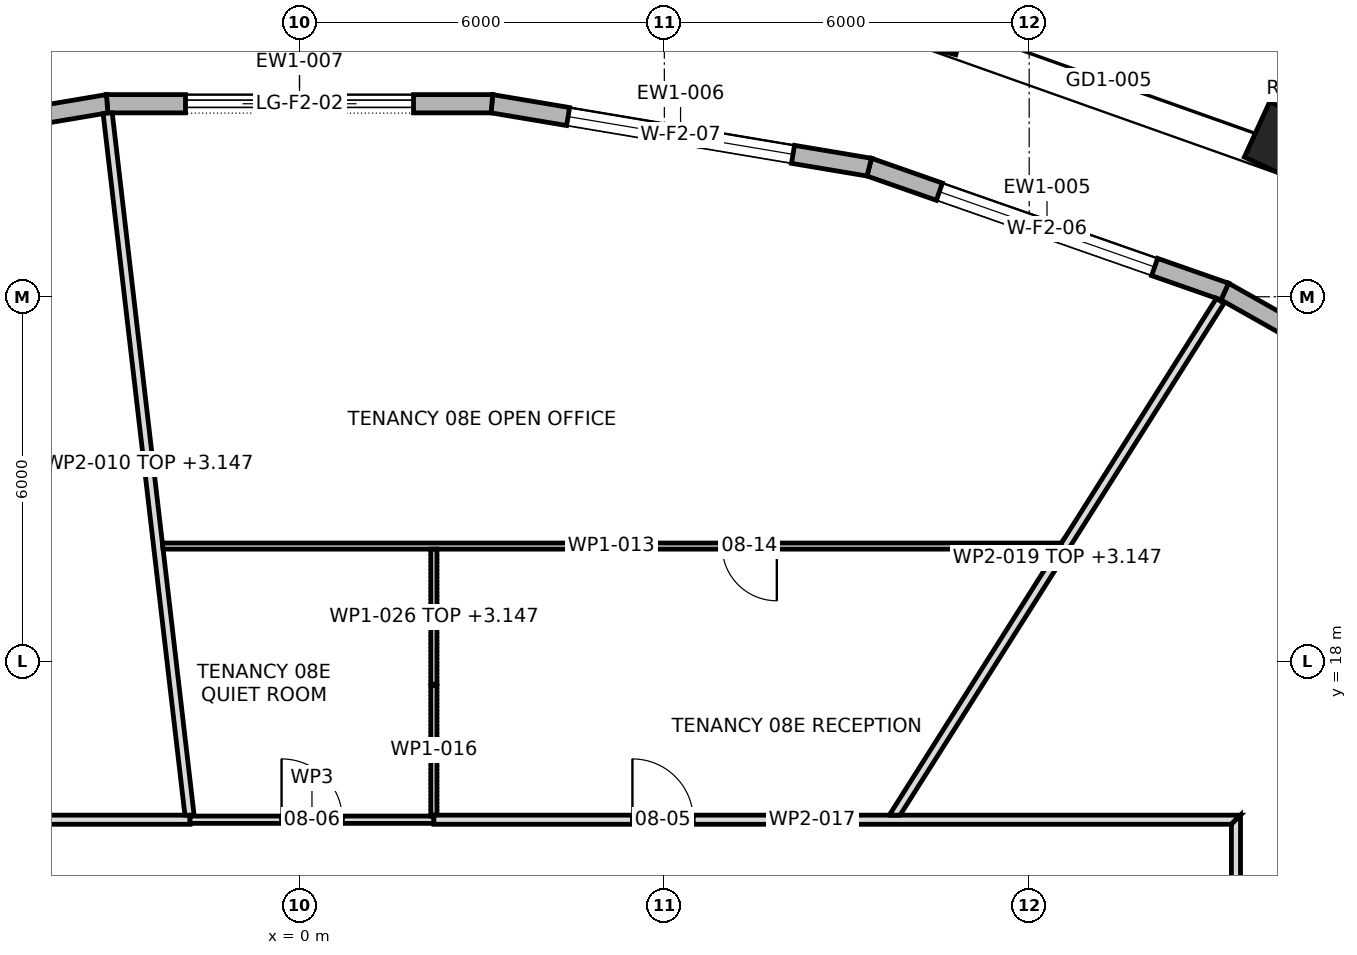
"""IFC4 building model, lengths in metres.
Left out: names, types, materials, properties, quantities, classifications, styles, units other than length and angle.
Written with IfcOpenShell. Run it as: python <this file> out.ifc"""

import sys

from ifc_helpers import new_model, si_unit, direction, frame, frame_2d, origin, origin_2d, place, context, subcontext, project, spatial, polyline, rectangle, outline, extrude, element, fill, save


model = new_model("IFC4")
c1 = context("Model", 3, precision=1e-05, world=origin(), true_north=direction((0.0, 1.0)))
c2 = subcontext(c1, "Body", "Model", "MODEL_VIEW")
j1 = project(units=[si_unit("LENGTHUNIT", "METRE"), si_unit("PLANEANGLEUNIT", "RADIAN")], contexts=[c1])
p1 = place(None, origin())
s1 = spatial("IfcSite", under=j1, at=p1, CompositionType="ELEMENT")
p2 = place(p1, origin())
s2 = spatial("IfcBuilding", under=s1, at=p2, CompositionType="ELEMENT")
p3 = place(p2, frame((0.0, 0.0, 117.1)))
s3 = spatial("IfcBuildingStorey", under=s2, at=p3, CompositionType="ELEMENT", Elevation=117.1)
for number, where, z_axis, x_axis in (
    (1, (16.474, 26.418, 0.0), (0.0, 0.0, 1.0), (-0.909, 0.417, 0.0)),
    (2, (10.145, 28.665, 0.0), (0.0, 0.0, 1.0), (-0.968, 0.252, 0.0)),
):
    element("IfcColumn", number, at=place(p3, frame(where, z_axis=z_axis, x_axis=x_axis)), inside=s3, PredefinedType="COLUMN", context=c2, shape_type="SweptSolid", body=[
        extrude(rectangle(XDim=1.6, YDim=1.0, at=origin_2d()), origin(), (0.0, 0.0, 1.0), 4.2),
    ])
p4 = place(p3, frame((20.48, 21.115, 0.0), z_axis=(0.0, 0.0, 1.0), x_axis=(-0.870858332497, 0.491534093142, 0.0)))
e3 = element("IfcWall", 3, at=p4, inside=s3, PredefinedType="STANDARD", context=c2, shape_type="SweptSolid", body=[
    extrude(outline(polyline([(-0.014, -0.15), (6.058, -0.15), (6.031, 0.15), (0.014, 0.15), (-0.014, -0.15)])), origin(), (0.0, 0.0, 1.0), 3.9),
])
p5 = place(p4, frame((1.147, 0.0, 0.6)))
e4 = element("IfcOpeningElement", 4, at=p5, cuts=e3, PredefinedType="OPENING", context=c2, shape_type="SweptSolid", body=[
    extrude(rectangle(XDim=3.75, YDim=2.85, at=frame_2d((1.875, 1.425))), frame((0.0, 0.162, 0.0), z_axis=(0.0, -1.0, 0.0), x_axis=(1.0, 0.0, 0.0)), (0.0, 0.0, 1.0), 0.324),
])
p6 = place(p3, frame((15.216, 24.086, 0.0), z_axis=(0.0, 0.0, 1.0), x_axis=(-0.94389706045, 0.330239820849, 0.0)))
e5 = element("IfcWall", 5, at=p6, inside=s3, PredefinedType="STANDARD", context=c2, shape_type="SweptSolid", body=[
    extrude(outline(polyline([(-0.013, -0.15), (6.207, -0.15), (6.182, 0.15), (0.013, 0.15), (-0.013, -0.15)])), origin(), (0.0, 0.0, 1.0), 3.9),
])
p7 = place(p6, frame((1.222, 0.0, 0.6)))
e6 = element("IfcOpeningElement", 6, at=p7, cuts=e5, PredefinedType="OPENING", context=c2, shape_type="SweptSolid", body=[
    extrude(rectangle(XDim=3.75, YDim=2.85, at=frame_2d((1.875, 1.425))), frame((0.0, 0.162, 0.0), z_axis=(0.0, -1.0, 0.0), x_axis=(1.0, 0.0, 0.0)), (0.0, 0.0, 1.0), 0.324),
])
p8 = place(p3, frame((9.369, 26.131, 0.0), z_axis=(0.0, 0.0, 1.0), x_axis=(-0.986176011722, 0.165701158427, 0.0)))
e7 = element("IfcWall", 7, at=p8, inside=s3, PredefinedType="STANDARD", context=c2, shape_type="SweptSolid", body=[
    extrude(outline(polyline([(-0.013, -0.15), (6.305, -0.15), (6.28, 0.15), (0.013, 0.15), (-0.013, -0.15)])), origin(), (0.0, 0.0, 1.0), 3.9),
])
p9 = place(p8, frame((1.271, 0.0, 0.6)))
e8 = element("IfcOpeningElement", 8, at=p9, cuts=e7, PredefinedType="OPENING", context=c2, shape_type="SweptSolid", body=[
    extrude(rectangle(XDim=3.75, YDim=2.85, at=frame_2d((1.875, 1.425))), frame((0.0, 0.162, 0.0), z_axis=(0.0, -1.0, 0.0), x_axis=(1.0, 0.0, 0.0)), (0.0, 0.0, 1.0), 0.324),
])
p10 = place(p3, frame((3.164, 27.174, 0.0), z_axis=(0.0, 0.0, 1.0), x_axis=(-1.0, 0.0, 0.0)))
e9 = element("IfcWall", 9, at=p10, inside=s3, PredefinedType="STANDARD", context=c2, shape_type="SweptSolid", body=[
    extrude(outline(polyline([(-0.012, -0.15), (6.34, -0.15), (6.315, 0.15), (0.012, 0.15), (-0.012, -0.15)])), origin(), (0.0, 0.0, 1.0), 3.9),
])
p11 = place(p10, frame((1.289, 0.0, 0.0)))
e10 = element("IfcOpeningElement", 10, at=p11, cuts=e9, PredefinedType="OPENING", context=c2, shape_type="SweptSolid", body=[
    extrude(rectangle(XDim=3.75, YDim=3.45, at=frame_2d((1.875, 1.725))), frame((0.0, 0.162, 0.0), z_axis=(0.0, -1.0, 0.0), x_axis=(1.0, 0.0, 0.0)), (0.0, 0.0, 1.0), 0.324),
])
p12 = place(p3, frame((-3.164, 27.174, 0.0), z_axis=(0.0, 0.0, 1.0), x_axis=(-0.986176011722, -0.165701158427, 0.0)))
e11 = element("IfcWall", 11, at=p12, inside=s3, PredefinedType="STANDARD", context=c2, shape_type="SweptSolid", body=[
    extrude(outline(polyline([(-0.012, -0.15), (6.305, -0.15), (6.28, 0.15), (0.012, 0.15), (-0.012, -0.15)])), origin(), (0.0, 0.0, 1.0), 3.9),
])
p13 = place(p12, frame((1.271, 0.0, 0.6)))
e12 = element("IfcOpeningElement", 12, at=p13, cuts=e11, PredefinedType="OPENING", context=c2, shape_type="SweptSolid", body=[
    extrude(rectangle(XDim=3.75, YDim=2.85, at=frame_2d((1.875, 1.425))), frame((0.0, 0.162, 0.0), z_axis=(0.0, -1.0, 0.0), x_axis=(1.0, 0.0, 0.0)), (0.0, 0.0, 1.0), 0.324),
])
p14 = place(p3, frame((-15.475, 15.4, 0.0), z_axis=(0.0, 0.0, 1.0), x_axis=(1.0, 0.0, 0.0)))
e13 = element("IfcWall", 13, at=p14, inside=s3, PredefinedType="PARTITIONING", context=c2, shape_type="SweptSolid", body=[
    extrude(outline(polyline([(13.675, 0.075), (11.721, 0.075), (9.768, 0.075), (7.814, 0.075), (5.861, 0.075), (3.907, 0.075), (1.954, 0.075), (0.0, 0.075), (0.15, -0.075), (2.082, -0.075), (4.014, -0.075), (5.947, -0.075), (7.879, -0.075), (9.811, -0.075), (11.743, -0.075), (13.675, -0.075), (13.675, 0.075)])), origin(), (0.0, 0.0, 1.0), 3.9),
])
p15 = place(p14, frame((5.975, 0.0, 0.0)))
e14 = element("IfcOpeningElement", 14, at=p15, cuts=e13, PredefinedType="OPENING", context=c2, shape_type="SweptSolid", body=[
    extrude(rectangle(XDim=1.8, YDim=2.1, at=frame_2d((0.9, 1.05))), frame((0.0, 0.087, 0.0), z_axis=(0.0, -1.0, 0.0), x_axis=(1.0, 0.0, 0.0)), (0.0, 0.0, 1.0), 0.174),
])
p16 = place(p3, frame((-3.155, 27.019, 0.0), z_axis=(0.0, 0.0, 1.0), x_axis=(0.11582313458, -0.993269853311, 0.0)))
e15 = element("IfcWall", 15, at=p16, inside=s3, PredefinedType="PARTITIONING", context=c2, shape_type="SweptSolid", body=[
    extrude(outline(polyline([(0.0, -0.075), (1.936, -0.075), (3.871, -0.075), (5.807, -0.075), (7.742, -0.075), (9.678, -0.075), (11.614, -0.075), (11.624, 0.009), (11.638, 0.007), (11.646, 0.072), (11.646, 0.075), (9.706, 0.075), (7.765, 0.075), (5.825, 0.075), (3.885, 0.075), (1.944, 0.075), (0.004, 0.075), (0.0, 0.042), (0.0, -0.075)])), origin(), (0.0, 0.0, 1.0), 3.147),
])
p17 = place(p3, frame((-2.255, 19.9, 0.0), z_axis=(0.0, 0.0, 1.0), x_axis=(1.0, 0.0, 0.0)))
e16 = element("IfcWall", 16, at=p17, inside=s3, PredefinedType="PARTITIONING", context=c2, shape_type="SweptSolid", body=[
    extrude(outline(polyline([(0.011, -0.05), (1.479, -0.05), (2.947, -0.05), (4.415, -0.05), (4.415, -0.05), (4.515, -0.05), (4.515, -0.05), (6.216, -0.05), (7.917, -0.05), (9.619, -0.05), (11.32, -0.05), (13.021, -0.05), (14.723, -0.05), (14.775, 0.032), (14.775, 0.032), (14.786, 0.05), (14.786, 0.05), (12.938, 0.05), (11.089, 0.05), (9.241, 0.05), (7.393, 0.05), (5.545, 0.05), (3.697, 0.05), (1.848, 0.05), (0.0, 0.05), (0.0, 0.048), (0.011, -0.05)])), origin(), (0.0, 0.0, 1.0), 3.9),
])
p18 = place(p17, frame((9.205, 0.0, 0.0)))
e17 = element("IfcOpeningElement", 17, at=p18, cuts=e16, PredefinedType="OPENING", context=c2, shape_type="SweptSolid", body=[
    extrude(rectangle(XDim=0.9, YDim=2.1, at=frame_2d((0.45, 1.05))), frame((0.0, 0.062, 0.0), z_axis=(0.0, -1.0, 0.0), x_axis=(1.0, 0.0, 0.0)), (0.0, 0.0, 1.0), 0.124),
])
p19 = place(p3, frame((-1.8, 15.4, 0.0), z_axis=(0.0, 0.0, 1.0), x_axis=(1.0, 0.0, 0.0)))
e18 = element("IfcWall", 18, at=p19, inside=s3, PredefinedType="PARTITIONING", context=c2, shape_type="SweptSolid", body=[
    extrude(rectangle(XDim=4.01, YDim=0.12, at=frame_2d((2.005, 0.0))), origin(), (0.0, 0.0, 1.0), 3.9),
])
p20 = place(p19, frame((1.505, 0.0, 0.0)))
e19 = element("IfcOpeningElement", 19, at=p20, cuts=e18, PredefinedType="OPENING", context=c2, shape_type="SweptSolid", body=[
    extrude(rectangle(XDim=1.0, YDim=2.1, at=frame_2d((0.5, 1.05))), frame((0.0, 0.072, 0.0), z_axis=(0.0, -1.0, 0.0), x_axis=(1.0, 0.0, 0.0)), (0.0, 0.0, 1.0), 0.144),
])
p21 = place(p3, frame((2.21, 15.46, 0.0), z_axis=(0.0, 0.0, 1.0), x_axis=(0.0, 1.0, 0.0)))
e20 = element("IfcWall", 20, at=p21, inside=s3, PredefinedType="PARTITIONING", context=c2, shape_type="SweptSolid", body=[
    extrude(outline(polyline([(0.0, 0.05), (0.0, 0.0), (0.015, 0.0), (0.015, -0.05), (2.157, -0.05), (2.157, 0.05), (0.0, 0.05)])), origin(), (0.0, 0.0, 1.0), 3.9),
])
p22 = place(p3, frame((2.21, 15.4, 0.0), z_axis=(0.0, 0.0, 1.0), x_axis=(1.0, 0.0, 0.0)))
e21 = element("IfcWall", 21, at=p22, inside=s3, PredefinedType="PARTITIONING", context=c2, shape_type="SweptSolid", body=[
    extrude(outline(polyline([(0.0, -0.075), (1.874, -0.075), (3.747, -0.075), (5.621, -0.075), (7.494, -0.075), (9.368, -0.075), (11.241, -0.075), (13.115, -0.075), (13.265, 0.075), (11.37, 0.075), (9.475, 0.075), (7.58, 0.075), (5.685, 0.075), (3.79, 0.075), (1.895, 0.075), (0.0, 0.075), (0.0, -0.075)])), origin(), (0.0, 0.0, 1.0), 3.9),
])
p23 = place(p22, frame((3.265, 0.0, 0.0)))
e22 = element("IfcOpeningElement", 22, at=p23, cuts=e21, PredefinedType="OPENING", context=c2, shape_type="SweptSolid", body=[
    extrude(rectangle(XDim=1.0, YDim=2.1, at=frame_2d((0.5, 1.05))), frame((0.0, 0.087, 0.0), z_axis=(0.0, -1.0, 0.0), x_axis=(1.0, 0.0, 0.0)), (0.0, 0.0, 1.0), 0.174),
])
p24 = place(p3, frame((9.762, 15.435, 0.0), z_axis=(0.0, 0.0, 1.0), x_axis=(0.534830284385, 0.844959506074, 0.0)))
e23 = element("IfcWall", 23, at=p24, inside=s3, PredefinedType="PARTITIONING", context=c2, shape_type="SweptSolid", body=[
    extrude(outline(polyline([(10.057, 0.075), (8.47, 0.075), (6.883, 0.075), (5.295, 0.075), (5.211, 0.022), (5.177, 0.075), (3.452, 0.075), (1.726, 0.075), (0.0, 0.075), (0.0, 0.075), (0.095, -0.075), (2.087, -0.075), (4.08, -0.075), (6.072, -0.075), (8.064, -0.075), (10.057, -0.075), (10.057, 0.075)])), origin(), (0.0, 0.0, 1.0), 3.147),
])
p25 = place(p3, frame((15.4, -15.475, 0.0), z_axis=(0.0, 0.0, 1.0), x_axis=(0.0, 1.0, 0.0)))
e24 = element("IfcWall", 24, at=p25, inside=s3, PredefinedType="PARTITIONING", context=c2, shape_type="SweptSolid", body=[
    extrude(outline(polyline([(0.0, -0.075), (1.935, -0.075), (3.869, -0.075), (5.803, -0.075), (7.738, -0.075), (9.672, -0.075), (11.606, -0.075), (13.541, -0.075), (15.475, -0.075), (17.409, -0.075), (19.344, -0.075), (21.278, -0.075), (23.212, -0.075), (25.147, -0.075), (27.081, -0.075), (29.016, -0.075), (30.95, -0.075), (30.8, 0.075), (28.885, 0.075), (26.969, 0.075), (25.053, 0.075), (23.138, 0.075), (21.222, 0.075), (19.306, 0.075), (17.391, 0.075), (15.475, 0.075), (13.56, 0.075), (11.644, 0.075), (9.728, 0.075), (7.812, 0.075), (5.897, 0.075), (3.981, 0.075), (2.066, 0.075), (0.15, 0.075), (0.0, -0.075)])), origin(), (0.0, 0.0, 1.0), 3.9),
])
p26 = place(p25, frame((8.595, 0.0, 0.0)))
e25 = element("IfcOpeningElement", 25, at=p26, cuts=e24, PredefinedType="OPENING", context=c2, shape_type="SweptSolid", body=[
    extrude(rectangle(XDim=1.8, YDim=2.1, at=frame_2d((0.9, 1.05))), frame((0.0, 0.087, 0.0), z_axis=(0.0, -1.0, 0.0), x_axis=(1.0, 0.0, 0.0)), (0.0, 0.0, 1.0), 0.174),
])
p27 = place(p25, frame((17.81, 0.0, 0.0)))
e26 = element("IfcOpeningElement", 26, at=p27, cuts=e24, PredefinedType="OPENING", context=c2, shape_type="SweptSolid", body=[
    extrude(rectangle(XDim=1.0, YDim=2.1, at=frame_2d((0.5, 1.05))), frame((0.0, 0.087, 0.0), z_axis=(0.0, -1.0, 0.0), x_axis=(1.0, 0.0, 0.0)), (0.0, 0.0, 1.0), 0.174),
])
p28 = place(p25, frame((25.75, 0.0, 0.0)))
e27 = element("IfcOpeningElement", 27, at=p28, cuts=e24, PredefinedType="OPENING", context=c2, shape_type="SweptSolid", body=[
    extrude(rectangle(XDim=1.8, YDim=2.1, at=frame_2d((0.9, 1.05))), frame((0.0, 0.087, 0.0), z_axis=(0.0, -1.0, 0.0), x_axis=(1.0, 0.0, 0.0)), (0.0, 0.0, 1.0), 0.174),
])
p29 = place(p3, frame((2.21, 17.618, 0.0), z_axis=(0.0, 0.0, 1.0), x_axis=(0.0, 1.0, 0.0)))
e28 = element("IfcWall", 28, at=p29, inside=s3, PredefinedType="PARTITIONING", context=c2, shape_type="SweptSolid", body=[
    extrude(outline(polyline([(0.0, -0.05), (2.232, -0.05), (2.232, 0.05), (0.0, 0.05), (0.0, -0.05)])), origin(), (0.0, 0.0, 1.0), 3.147),
])
p30 = place(p7, origin())
e29 = element("IfcWindow", 29, at=p30, inside=s3, PartitioningType="TRIPLE_PANEL_VERTICAL", PredefinedType="WINDOW", context=c2, shape_type="SweptSolid", body=[
    extrude(rectangle(XDim=3.75, YDim=2.85, at=frame_2d((1.875, 1.425))), frame((0.0, 0.03, 0.0), z_axis=(0.0, -1.0, 0.0), x_axis=(1.0, 0.0, 0.0)), (0.0, 0.0, 1.0), 0.06),
])
fill(e6, e29)
p31 = place(p9, origin())
e30 = element("IfcWindow", 30, at=p31, inside=s3, PartitioningType="TRIPLE_PANEL_VERTICAL", PredefinedType="WINDOW", context=c2, shape_type="SweptSolid", body=[
    extrude(rectangle(XDim=3.75, YDim=2.85, at=frame_2d((1.875, 1.425))), frame((0.0, 0.03, 0.0), z_axis=(0.0, -1.0, 0.0), x_axis=(1.0, 0.0, 0.0)), (0.0, 0.0, 1.0), 0.06),
])
fill(e8, e30)
p32 = place(p11, origin())
e31 = element("IfcDoor", 31, at=p32, inside=s3, OperationType="DOUBLE_DOOR_SLIDING", PredefinedType="DOOR", context=c2, shape_type="SweptSolid", body=[
    extrude(rectangle(XDim=3.75, YDim=3.45, at=frame_2d((1.875, 1.725))), frame((0.0, 0.025, 0.0), z_axis=(0.0, -1.0, 0.0), x_axis=(1.0, 0.0, 0.0)), (0.0, 0.0, 1.0), 0.05),
])
fill(e10, e31)
p33 = place(p23, origin())
e32 = element("IfcDoor", 32, at=p33, inside=s3, OperationType="SINGLE_SWING_RIGHT", PredefinedType="DOOR", context=c2, shape_type="SweptSolid", body=[
    extrude(rectangle(XDim=1.0, YDim=2.1, at=frame_2d((0.5, 1.05))), frame((0.0, 0.025, 0.0), z_axis=(0.0, -1.0, 0.0), x_axis=(1.0, 0.0, 0.0)), (0.0, 0.0, 1.0), 0.05),
])
fill(e22, e32)
p34 = place(p20, origin())
e33 = element("IfcDoor", 33, at=p34, inside=s3, OperationType="SINGLE_SWING_RIGHT", PredefinedType="DOOR", context=c2, shape_type="SweptSolid", body=[
    extrude(rectangle(XDim=1.0, YDim=2.1, at=frame_2d((0.5, 1.05))), frame((0.0, 0.025, 0.0), z_axis=(0.0, -1.0, 0.0), x_axis=(1.0, 0.0, 0.0)), (0.0, 0.0, 1.0), 0.05),
])
fill(e19, e33)
p35 = place(p18, frame((0.9, 0.0, 0.0), z_axis=(0.0, 0.0, 1.0), x_axis=(-1.0, 0.0, 0.0)))
e34 = element("IfcDoor", 34, at=p35, inside=s3, OperationType="SINGLE_SWING_RIGHT", PredefinedType="DOOR", context=c2, shape_type="SweptSolid", body=[
    extrude(rectangle(XDim=0.9, YDim=2.1, at=frame_2d((0.45, 1.05))), frame((0.0, 0.025, 0.0), z_axis=(0.0, -1.0, 0.0), x_axis=(1.0, 0.0, 0.0)), (0.0, 0.0, 1.0), 0.05),
])
fill(e17, e34)
save(model, sys.argv[1])
